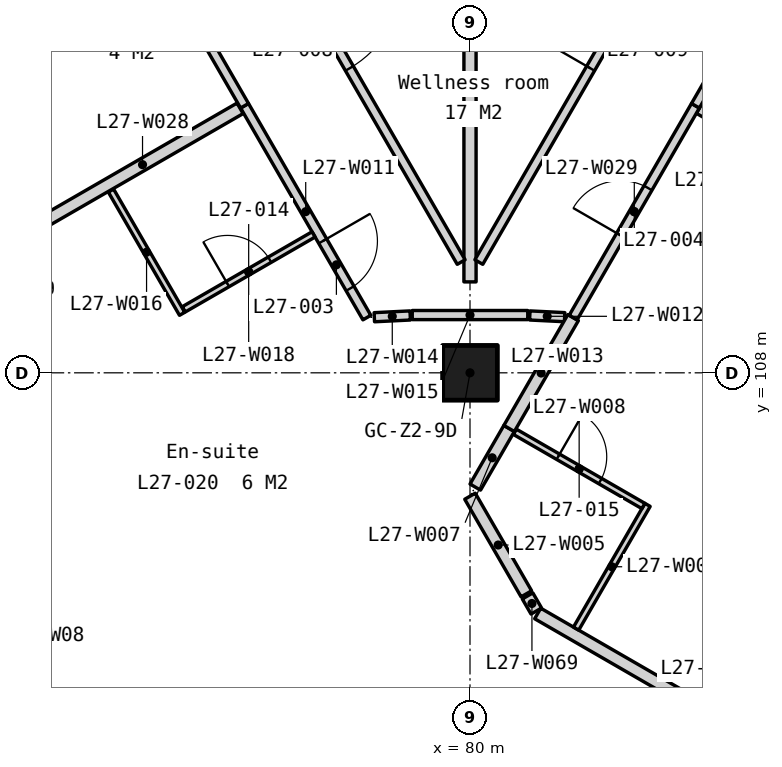
"""IFC4 building model, lengths in metres.
Left out: names, types, materials, properties, quantities, classifications, styles, units other than length and angle.
Written with IfcOpenShell. Run it as: python <this file> out.ifc"""

import sys

from ifc_helpers import new_model, si_unit, direction, frame, frame_2d, origin, origin_2d, place, context, subcontext, project, spatial, polyline, rectangle, outline, extrude, element, fill, save


model = new_model("IFC4")
c1 = context("Model", 3, precision=1e-05, world=origin(), true_north=direction((0.0, 1.0)))
c2 = subcontext(c1, "Body", "Model", "MODEL_VIEW")
j1 = project(units=[si_unit("LENGTHUNIT", "METRE"), si_unit("PLANEANGLEUNIT", "RADIAN")], contexts=[c1])
p1 = place(None, origin())
s1 = spatial("IfcSite", under=j1, at=p1, CompositionType="ELEMENT")
p2 = place(p1, origin())
s2 = spatial("IfcBuilding", under=s1, at=p2, CompositionType="ELEMENT")
p3 = place(p2, frame((0.0, 0.0, 109.8)))
s3 = spatial("IfcBuildingStorey", under=s2, at=p3, CompositionType="ELEMENT", Elevation=109.8)
p4 = place(p3, frame((80.0, 108.0, 0.0), z_axis=(0.0, 0.0, 1.0), x_axis=(1.0, 0.0, 0.0)))
e1 = element("IfcColumn", 1, at=p4, inside=s3, PredefinedType="COLUMN", context=c2, shape_type="SweptSolid", body=[
    extrude(rectangle(XDim=0.9, YDim=0.9, at=origin_2d()), origin(), (0.0, 0.0, 1.0), 3.5),
])
p5 = place(p3, frame((56.073, 130.263, -0.15), z_axis=(0.0, 0.0, 1.0), x_axis=(0.500000478905, -0.866025127289, 0.0)))
e2 = element("IfcWall", 2, at=p5, inside=s3, PredefinedType="SOLIDWALL", context=c2, shape_type="SweptSolid", body=[
    extrude(outline(polyline([(42.643, 0.0), (42.643, 3.5), (0.0, 3.5), (0.0, 0.0), (42.643, 0.0)])), frame((0.0, 0.225, 0.0), z_axis=(0.0, -1.0, 0.0), x_axis=(1.0, 0.0, 0.0)), (0.0, 0.0, 1.0), 0.45),
])
p6 = place(p5, frame((2.814, 0.0, 1.05)))
e3 = element("IfcOpeningElement", 3, at=p6, cuts=e2, PredefinedType="OPENING", context=c2, shape_type="SweptSolid", body=[
    extrude(rectangle(XDim=1.2, YDim=1.5, at=frame_2d((0.6, 0.75))), frame((0.0, 0.235, 0.0), z_axis=(0.0, -1.0, 0.0), x_axis=(1.0, 0.0, 0.0)), (0.0, 0.0, 1.0), 0.47),
])
p7 = place(p5, frame((4.514, 0.0, 1.05)))
e4 = element("IfcOpeningElement", 4, at=p7, cuts=e2, PredefinedType="OPENING", context=c2, shape_type="SweptSolid", body=[
    extrude(rectangle(XDim=1.2, YDim=1.5, at=frame_2d((0.6, 0.75))), frame((0.0, 0.235, 0.0), z_axis=(0.0, -1.0, 0.0), x_axis=(1.0, 0.0, 0.0)), (0.0, 0.0, 1.0), 0.47),
])
p8 = place(p5, frame((11.343, 0.0, 1.05)))
e5 = element("IfcOpeningElement", 5, at=p8, cuts=e2, PredefinedType="OPENING", context=c2, shape_type="SweptSolid", body=[
    extrude(rectangle(XDim=1.2, YDim=1.5, at=frame_2d((0.6, 0.75))), frame((0.0, 0.235, 0.0), z_axis=(0.0, -1.0, 0.0), x_axis=(1.0, 0.0, 0.0)), (0.0, 0.0, 1.0), 0.47),
])
p9 = place(p5, frame((13.043, 0.0, 1.05)))
e6 = element("IfcOpeningElement", 6, at=p9, cuts=e2, PredefinedType="OPENING", context=c2, shape_type="SweptSolid", body=[
    extrude(rectangle(XDim=1.2, YDim=1.5, at=frame_2d((0.6, 0.75))), frame((0.0, 0.235, 0.0), z_axis=(0.0, -1.0, 0.0), x_axis=(1.0, 0.0, 0.0)), (0.0, 0.0, 1.0), 0.47),
])
p10 = place(p5, frame((19.872, 0.0, 1.05)))
e7 = element("IfcOpeningElement", 7, at=p10, cuts=e2, PredefinedType="OPENING", context=c2, shape_type="SweptSolid", body=[
    extrude(rectangle(XDim=1.2, YDim=1.5, at=frame_2d((0.6, 0.75))), frame((0.0, 0.235, 0.0), z_axis=(0.0, -1.0, 0.0), x_axis=(1.0, 0.0, 0.0)), (0.0, 0.0, 1.0), 0.47),
])
p11 = place(p5, frame((21.572, 0.0, 1.05)))
e8 = element("IfcOpeningElement", 8, at=p11, cuts=e2, PredefinedType="OPENING", context=c2, shape_type="SweptSolid", body=[
    extrude(rectangle(XDim=1.2, YDim=1.5, at=frame_2d((0.6, 0.75))), frame((0.0, 0.235, 0.0), z_axis=(0.0, -1.0, 0.0), x_axis=(1.0, 0.0, 0.0)), (0.0, 0.0, 1.0), 0.47),
])
p12 = place(p5, frame((28.4, 0.0, 1.05)))
e9 = element("IfcOpeningElement", 9, at=p12, cuts=e2, PredefinedType="OPENING", context=c2, shape_type="SweptSolid", body=[
    extrude(rectangle(XDim=1.2, YDim=1.5, at=frame_2d((0.6, 0.75))), frame((0.0, 0.235, 0.0), z_axis=(0.0, -1.0, 0.0), x_axis=(1.0, 0.0, 0.0)), (0.0, 0.0, 1.0), 0.47),
])
p13 = place(p5, frame((30.1, 0.0, 1.05)))
e10 = element("IfcOpeningElement", 10, at=p13, cuts=e2, PredefinedType="OPENING", context=c2, shape_type="SweptSolid", body=[
    extrude(rectangle(XDim=1.2, YDim=1.5, at=frame_2d((0.6, 0.75))), frame((0.0, 0.235, 0.0), z_axis=(0.0, -1.0, 0.0), x_axis=(1.0, 0.0, 0.0)), (0.0, 0.0, 1.0), 0.47),
])
p14 = place(p5, frame((36.929, 0.0, 1.05)))
e11 = element("IfcOpeningElement", 11, at=p14, cuts=e2, PredefinedType="OPENING", context=c2, shape_type="SweptSolid", body=[
    extrude(rectangle(XDim=1.2, YDim=1.5, at=frame_2d((0.6, 0.75))), frame((0.0, 0.235, 0.0), z_axis=(0.0, -1.0, 0.0), x_axis=(1.0, 0.0, 0.0)), (0.0, 0.0, 1.0), 0.47),
])
p15 = place(p5, frame((38.629, 0.0, 1.05)))
e12 = element("IfcOpeningElement", 12, at=p15, cuts=e2, PredefinedType="OPENING", context=c2, shape_type="SweptSolid", body=[
    extrude(rectangle(XDim=1.2, YDim=1.5, at=frame_2d((0.6, 0.75))), frame((0.0, 0.235, 0.0), z_axis=(0.0, -1.0, 0.0), x_axis=(1.0, 0.0, 0.0)), (0.0, 0.0, 1.0), 0.47),
])
p16 = place(p3, frame((82.605, 93.333, -0.15), z_axis=(0.0, 0.0, 1.0), x_axis=(0.500000478905, 0.866025127289, 0.0)))
e13 = element("IfcWall", 13, at=p16, inside=s3, PredefinedType="SOLIDWALL", context=c2, shape_type="SweptSolid", body=[
    extrude(outline(polyline([(42.643, 0.0), (42.643, 3.5), (0.0, 3.5), (0.0, 0.0), (42.643, 0.0)])), frame((0.0, 0.225, 0.0), z_axis=(0.0, -1.0, 0.0), x_axis=(1.0, 0.0, 0.0)), (0.0, 0.0, 1.0), 0.45),
])
p17 = place(p16, frame((2.814, 0.0, 1.05)))
e14 = element("IfcOpeningElement", 14, at=p17, cuts=e13, PredefinedType="OPENING", context=c2, shape_type="SweptSolid", body=[
    extrude(rectangle(XDim=1.2, YDim=1.5, at=frame_2d((0.6, 0.75))), frame((0.0, 0.235, 0.0), z_axis=(0.0, -1.0, 0.0), x_axis=(1.0, 0.0, 0.0)), (0.0, 0.0, 1.0), 0.47),
])
p18 = place(p16, frame((4.514, 0.0, 1.05)))
e15 = element("IfcOpeningElement", 15, at=p18, cuts=e13, PredefinedType="OPENING", context=c2, shape_type="SweptSolid", body=[
    extrude(rectangle(XDim=1.2, YDim=1.5, at=frame_2d((0.6, 0.75))), frame((0.0, 0.235, 0.0), z_axis=(0.0, -1.0, 0.0), x_axis=(1.0, 0.0, 0.0)), (0.0, 0.0, 1.0), 0.47),
])
p19 = place(p16, frame((11.343, 0.0, 1.05)))
e16 = element("IfcOpeningElement", 16, at=p19, cuts=e13, PredefinedType="OPENING", context=c2, shape_type="SweptSolid", body=[
    extrude(rectangle(XDim=1.2, YDim=1.5, at=frame_2d((0.6, 0.75))), frame((0.0, 0.235, 0.0), z_axis=(0.0, -1.0, 0.0), x_axis=(1.0, 0.0, 0.0)), (0.0, 0.0, 1.0), 0.47),
])
p20 = place(p16, frame((13.043, 0.0, 1.05)))
e17 = element("IfcOpeningElement", 17, at=p20, cuts=e13, PredefinedType="OPENING", context=c2, shape_type="SweptSolid", body=[
    extrude(rectangle(XDim=1.2, YDim=1.5, at=frame_2d((0.6, 0.75))), frame((0.0, 0.235, 0.0), z_axis=(0.0, -1.0, 0.0), x_axis=(1.0, 0.0, 0.0)), (0.0, 0.0, 1.0), 0.47),
])
p21 = place(p16, frame((19.872, 0.0, 1.05)))
e18 = element("IfcOpeningElement", 18, at=p21, cuts=e13, PredefinedType="OPENING", context=c2, shape_type="SweptSolid", body=[
    extrude(rectangle(XDim=1.2, YDim=1.5, at=frame_2d((0.6, 0.75))), frame((0.0, 0.235, 0.0), z_axis=(0.0, -1.0, 0.0), x_axis=(1.0, 0.0, 0.0)), (0.0, 0.0, 1.0), 0.47),
])
p22 = place(p16, frame((21.572, 0.0, 1.05)))
e19 = element("IfcOpeningElement", 19, at=p22, cuts=e13, PredefinedType="OPENING", context=c2, shape_type="SweptSolid", body=[
    extrude(rectangle(XDim=1.2, YDim=1.5, at=frame_2d((0.6, 0.75))), frame((0.0, 0.235, 0.0), z_axis=(0.0, -1.0, 0.0), x_axis=(1.0, 0.0, 0.0)), (0.0, 0.0, 1.0), 0.47),
])
p23 = place(p16, frame((28.4, 0.0, 1.05)))
e20 = element("IfcOpeningElement", 20, at=p23, cuts=e13, PredefinedType="OPENING", context=c2, shape_type="SweptSolid", body=[
    extrude(rectangle(XDim=1.2, YDim=1.5, at=frame_2d((0.6, 0.75))), frame((0.0, 0.235, 0.0), z_axis=(0.0, -1.0, 0.0), x_axis=(1.0, 0.0, 0.0)), (0.0, 0.0, 1.0), 0.47),
])
p24 = place(p16, frame((30.1, 0.0, 1.05)))
e21 = element("IfcOpeningElement", 21, at=p24, cuts=e13, PredefinedType="OPENING", context=c2, shape_type="SweptSolid", body=[
    extrude(rectangle(XDim=1.2, YDim=1.5, at=frame_2d((0.6, 0.75))), frame((0.0, 0.235, 0.0), z_axis=(0.0, -1.0, 0.0), x_axis=(1.0, 0.0, 0.0)), (0.0, 0.0, 1.0), 0.47),
])
p25 = place(p16, frame((36.929, 0.0, 1.05)))
e22 = element("IfcOpeningElement", 22, at=p25, cuts=e13, PredefinedType="OPENING", context=c2, shape_type="SweptSolid", body=[
    extrude(rectangle(XDim=1.2, YDim=1.5, at=frame_2d((0.6, 0.75))), frame((0.0, 0.235, 0.0), z_axis=(0.0, -1.0, 0.0), x_axis=(1.0, 0.0, 0.0)), (0.0, 0.0, 1.0), 0.47),
])
p26 = place(p16, frame((38.629, 0.0, 1.05)))
e23 = element("IfcOpeningElement", 23, at=p26, cuts=e13, PredefinedType="OPENING", context=c2, shape_type="SweptSolid", body=[
    extrude(rectangle(XDim=1.2, YDim=1.5, at=frame_2d((0.6, 0.75))), frame((0.0, 0.235, 0.0), z_axis=(0.0, -1.0, 0.0), x_axis=(1.0, 0.0, 0.0)), (0.0, 0.0, 1.0), 0.47),
])
p27 = place(p3, frame((81.114, 104.042, 0.0), z_axis=(0.0, 0.0, 1.0), x_axis=(0.86602350115, -0.500003295444, 0.0)))
e24 = element("IfcWall", 24, at=p27, inside=s3, PredefinedType="PARTITIONING", context=c2, shape_type="SweptSolid", body=[
    extrude(rectangle(XDim=6.421, YDim=0.2, at=frame_2d((3.211, 0.0))), origin(), (0.0, 0.0, 1.0), 3.35),
])
p28 = place(p3, frame((80.0, 105.97, 0.0), z_axis=(0.0, 0.0, 1.0), x_axis=(0.499992292652, -0.866029853578, 0.0)))
e25 = element("IfcWall", 25, at=p28, inside=s3, PredefinedType="PARTITIONING", context=c2, shape_type="SweptSolid", body=[
    extrude(rectangle(XDim=1.854, YDim=0.2, at=frame_2d((0.927, 0.0))), origin(), (0.0, 0.0, 1.0), 3.35),
])
p29 = place(p3, frame((81.745, 103.793, 0.0), z_axis=(0.0, 0.0, 1.0), x_axis=(0.500016218704, 0.866016039709, 0.0)))
e26 = element("IfcWall", 26, at=p29, inside=s3, PredefinedType="PARTITIONING", context=c2, shape_type="SweptSolid", body=[
    extrude(rectangle(XDim=2.35, YDim=0.1, at=frame_2d((1.175, 0.0))), origin(), (0.0, 0.0, 1.0), 3.35),
])
p30 = place(p3, frame((80.087, 106.121, 0.0), z_axis=(0.0, 0.0, 1.0), x_axis=(0.500007201891, 0.866021245731, 0.0)))
e27 = element("IfcWall", 27, at=p30, inside=s3, PredefinedType="PARTITIONING", context=c2, shape_type="SweptSolid", body=[
    extrude(rectangle(XDim=1.113, YDim=0.2, at=frame_2d((0.557, 0.0))), origin(), (0.0, 0.0, 1.0), 3.35),
])
p31 = place(p3, frame((80.739, 107.03, 0.0), z_axis=(0.0, 0.0, 1.0), x_axis=(0.866023955769, -0.500002508028, 0.0)))
e28 = element("IfcWall", 28, at=p31, inside=s3, PredefinedType="PARTITIONING", context=c2, shape_type="SweptSolid", body=[
    extrude(rectangle(XDim=2.44, YDim=0.1, at=frame_2d((1.22, 0.0))), origin(), (0.0, 0.0, 1.0), 3.35),
])
p32 = place(p31, frame((0.82, 0.0, 0.0)))
e29 = element("IfcOpeningElement", 29, at=p32, cuts=e28, PredefinedType="OPENING", context=c2, shape_type="SweptSolid", body=[
    extrude(rectangle(XDim=0.8, YDim=2.1, at=frame_2d((0.4, 1.05))), frame((0.0, 0.06, 0.0), z_axis=(0.0, -1.0, 0.0), x_axis=(1.0, 0.0, 0.0)), (0.0, 0.0, 1.0), 0.12),
])
p33 = place(p3, frame((76.292, 112.392, 0.0), z_axis=(0.0, 0.0, 1.0), x_axis=(0.500009633848, -0.866019841608, 0.0)))
e30 = element("IfcWall", 30, at=p33, inside=s3, PredefinedType="PARTITIONING", context=c2, shape_type="SweptSolid", body=[
    extrude(rectangle(XDim=4.023, YDim=0.15, at=frame_2d((2.011, 0.0))), origin(), (0.0, 0.0, 1.0), 3.35),
])
p34 = place(p33, frame((2.571, 0.0, 0.0)))
e31 = element("IfcOpeningElement", 31, at=p34, cuts=e30, PredefinedType="OPENING", context=c2, shape_type="SweptSolid", body=[
    extrude(rectangle(XDim=0.9, YDim=2.1, at=frame_2d((0.45, 1.05))), frame((0.0, 0.085, 0.0), z_axis=(0.0, -1.0, 0.0), x_axis=(1.0, 0.0, 0.0)), (0.0, 0.0, 1.0), 0.17),
])
p35 = place(p3, frame((80.983, 108.943, 0.0), z_axis=(0.0, 0.0, 1.0), x_axis=(0.998801719891, -0.048940007579, 0.0)))
e32 = element("IfcWall", 32, at=p35, inside=s3, PredefinedType="PARTITIONING", context=c2, shape_type="SweptSolid", body=[
    extrude(rectangle(XDim=0.574, YDim=0.15, at=frame_2d((0.287, 0.0))), origin(), (0.0, 0.0, 1.0), 3.35),
])
p36 = place(p3, frame((80.643, 107.085, 0.0), z_axis=(0.0, 0.0, 1.0), x_axis=(0.499929868688, 0.86606589033, 0.0)))
e33 = element("IfcWall", 33, at=p36, inside=s3, PredefinedType="PARTITIONING", context=c2, shape_type="SweptSolid", body=[
    extrude(rectangle(XDim=2.106, YDim=0.2, at=frame_2d((1.053, 0.0))), origin(), (0.0, 0.0, 1.0), 3.35),
])
p37 = place(p3, frame((78.427, 108.914, 0.0), z_axis=(0.0, 0.0, 1.0), x_axis=(0.998790176711, 0.049175023181, 0.0)))
e34 = element("IfcWall", 34, at=p37, inside=s3, PredefinedType="PARTITIONING", context=c2, shape_type="SweptSolid", body=[
    extrude(rectangle(XDim=0.591, YDim=0.15, at=frame_2d((0.295, 0.0))), origin(), (0.0, 0.0, 1.0), 3.35),
])
p38 = place(p3, frame((79.05, 108.95, 0.0), z_axis=(0.0, 0.0, 1.0), x_axis=(1.0, 0.0, 0.0)))
e35 = element("IfcWall", 35, at=p38, inside=s3, PredefinedType="PARTITIONING", context=c2, shape_type="SweptSolid", body=[
    extrude(rectangle(XDim=1.9, YDim=0.15, at=frame_2d((0.95, 0.0))), origin(), (0.0, 0.0, 1.0), 3.35),
])
p39 = place(p3, frame((74.096, 110.997, 0.0), z_axis=(0.0, 0.0, 1.0), x_axis=(0.499954256575, -0.866051812152, 0.0)))
e36 = element("IfcWall", 36, at=p39, inside=s3, PredefinedType="PARTITIONING", context=c2, shape_type="SweptSolid", body=[
    extrude(rectangle(XDim=2.34, YDim=0.1, at=frame_2d((1.17, 0.0))), origin(), (0.0, 0.0, 1.0), 3.35),
])
p40 = place(p3, frame((80.0, 109.496, 0.0), z_axis=(0.0, 0.0, 1.0), x_axis=(0.0, 1.0, 0.0)))
e37 = element("IfcWall", 37, at=p40, inside=s3, PredefinedType="PARTITIONING", context=c2, shape_type="SweptSolid", body=[
    extrude(rectangle(XDim=8.179, YDim=0.2, at=frame_2d((4.09, 0.0))), origin(), (0.0, 0.0, 1.0), 2.801),
])
p41 = place(p3, frame((75.293, 109.044, 0.0), z_axis=(0.0, 0.0, 1.0), x_axis=(0.865997559407, 0.500048224776, 0.0)))
e38 = element("IfcWall", 38, at=p41, inside=s3, PredefinedType="PARTITIONING", context=c2, shape_type="SweptSolid", body=[
    extrude(rectangle(XDim=2.465, YDim=0.1, at=frame_2d((1.232, 0.0))), origin(), (0.0, 0.0, 1.0), 3.35),
])
p42 = place(p41, frame((0.833, 0.0, 0.0)))
e39 = element("IfcOpeningElement", 39, at=p42, cuts=e38, PredefinedType="OPENING", context=c2, shape_type="SweptSolid", body=[
    extrude(rectangle(XDim=0.8, YDim=2.1, at=frame_2d((0.4, 1.05))), frame((0.0, 0.06, 0.0), z_axis=(0.0, -1.0, 0.0), x_axis=(1.0, 0.0, 0.0)), (0.0, 0.0, 1.0), 0.12),
])
p43 = place(p3, frame((83.772, 112.355, 0.0), z_axis=(0.0, 0.0, 1.0), x_axis=(0.866094119867, -0.499880961361, 0.0)))
e40 = element("IfcWall", 40, at=p43, inside=s3, PredefinedType="PARTITIONING", context=c2, shape_type="SweptSolid", body=[
    extrude(rectangle(XDim=0.8, YDim=0.2, at=frame_2d((0.4, 0.0))), origin(), (0.0, 0.0, 1.0), 3.35),
])
p44 = place(p3, frame((73.01, 110.497, 0.0), z_axis=(0.0, 0.0, 1.0), x_axis=(0.866012199007, 0.500022870649, 0.0)))
e41 = element("IfcWall", 41, at=p44, inside=s3, PredefinedType="PARTITIONING", context=c2, shape_type="SweptSolid", body=[
    extrude(rectangle(XDim=3.705, YDim=0.2, at=frame_2d((1.853, 0.0))), origin(), (0.0, 0.0, 1.0), 3.35),
])
p45 = place(p3, frame((81.696, 108.908, 0.0), z_axis=(0.0, 0.0, 1.0), x_axis=(0.500009633848, 0.866019841608, 0.0)))
e42 = element("IfcWall", 42, at=p45, inside=s3, PredefinedType="PARTITIONING", context=c2, shape_type="SweptSolid", body=[
    extrude(rectangle(XDim=4.023, YDim=0.15, at=frame_2d((2.011, 0.0))), origin(), (0.0, 0.0, 1.0), 3.35),
])
p46 = place(p45, frame((1.562, 0.0, 0.0)))
e43 = element("IfcOpeningElement", 43, at=p46, cuts=e42, PredefinedType="OPENING", context=c2, shape_type="SweptSolid", body=[
    extrude(rectangle(XDim=0.9, YDim=2.1, at=frame_2d((0.45, 1.05))), frame((0.0, 0.085, 0.0), z_axis=(0.0, -1.0, 0.0), x_axis=(1.0, 0.0, 0.0)), (0.0, 0.0, 1.0), 0.17),
])
p47 = place(p3, frame((83.708, 112.392, 0.0), z_axis=(0.0, 0.0, 1.0), x_axis=(0.500042931351, 0.866000615939, 0.0)))
e44 = element("IfcWall", 44, at=p47, inside=s3, PredefinedType="PARTITIONING", context=c2, shape_type="SweptSolid", body=[
    extrude(rectangle(XDim=4.264, YDim=0.15, at=frame_2d((2.132, 0.0))), origin(), (0.0, 0.0, 1.0), 3.35),
])
p48 = place(p47, frame((2.964, 0.0, 0.0)))
e45 = element("IfcOpeningElement", 45, at=p48, cuts=e44, PredefinedType="OPENING", context=c2, shape_type="SweptSolid", body=[
    extrude(rectangle(XDim=1.0, YDim=2.1, at=frame_2d((0.5, 1.05))), frame((0.0, 0.085, 0.0), z_axis=(0.0, -1.0, 0.0), x_axis=(1.0, 0.0, 0.0)), (0.0, 0.0, 1.0), 0.17),
])
p49 = place(p3, frame((73.528, 117.18, 0.0), z_axis=(0.0, 0.0, 1.0), x_axis=(0.500019337512, -0.866014238979, 0.0)))
e46 = element("IfcWall", 46, at=p49, inside=s3, PredefinedType="PARTITIONING", context=c2, shape_type="SweptSolid", body=[
    extrude(rectangle(XDim=5.529, YDim=0.15, at=frame_2d((2.764, 0.0))), origin(), (0.0, 0.0, 1.0), 3.35),
])
p50 = place(p49, frame((2.264, 0.0, 0.0)))
e47 = element("IfcOpeningElement", 47, at=p50, cuts=e46, PredefinedType="OPENING", context=c2, shape_type="SweptSolid", body=[
    extrude(rectangle(XDim=1.0, YDim=2.1, at=frame_2d((0.5, 1.05))), frame((0.0, 0.085, 0.0), z_axis=(0.0, -1.0, 0.0), x_axis=(1.0, 0.0, 0.0)), (0.0, 0.0, 1.0), 0.17),
])
p51 = place(p3, frame((75.278, 117.75, 0.0), z_axis=(0.0, 0.0, 1.0), x_axis=(0.500002547313, -0.866023933087, 0.0)))
e48 = element("IfcWall", 48, at=p51, inside=s3, PredefinedType="PARTITIONING", context=c2, shape_type="SweptSolid", body=[
    extrude(rectangle(XDim=9.155, YDim=0.15, at=frame_2d((4.577, 0.0))), origin(), (0.0, 0.0, 1.0), 3.35),
])
p52 = place(p51, frame((3.677, 0.0, 0.0)))
e49 = element("IfcOpeningElement", 49, at=p52, cuts=e48, PredefinedType="OPENING", context=c2, shape_type="SweptSolid", body=[
    extrude(rectangle(XDim=1.8, YDim=2.1, at=frame_2d((0.9, 1.05))), frame((0.0, 0.085, 0.0), z_axis=(0.0, -1.0, 0.0), x_axis=(1.0, 0.0, 0.0)), (0.0, 0.0, 1.0), 0.17),
])
p53 = place(p3, frame((80.145, 109.822, 0.0), z_axis=(0.0, 0.0, 1.0), x_axis=(0.500002547313, 0.866023933087, 0.0)))
e50 = element("IfcWall", 50, at=p53, inside=s3, PredefinedType="PARTITIONING", context=c2, shape_type="SweptSolid", body=[
    extrude(rectangle(XDim=9.155, YDim=0.15, at=frame_2d((4.577, 0.0))), origin(), (0.0, 0.0, 1.0), 3.35),
])
p54 = place(p53, frame((3.677, 0.0, 0.0)))
e51 = element("IfcOpeningElement", 51, at=p54, cuts=e50, PredefinedType="OPENING", context=c2, shape_type="SweptSolid", body=[
    extrude(rectangle(XDim=1.8, YDim=2.1, at=frame_2d((0.9, 1.05))), frame((0.0, 0.085, 0.0), z_axis=(0.0, -1.0, 0.0), x_axis=(1.0, 0.0, 0.0)), (0.0, 0.0, 1.0), 0.17),
])
p55 = place(p3, frame((80.947, 104.331, 0.0), z_axis=(0.0, 0.0, 1.0), x_axis=(0.500164219654, -0.865930570761, 0.0)))
e52 = element("IfcWall", 52, at=p55, inside=s3, PredefinedType="PARTITIONING", context=c2, shape_type="SweptSolid", body=[
    extrude(rectangle(XDim=0.287, YDim=0.2, at=frame_2d((0.144, 0.0))), origin(), (0.0, 0.0, 1.0), 3.35),
])
p56 = place(p34, origin())
e53 = element("IfcDoor", 53, at=p56, inside=s3, OperationType="SINGLE_SWING_LEFT", PredefinedType="DOOR", context=c2, shape_type="SweptSolid", body=[
    extrude(rectangle(XDim=0.9, YDim=2.1, at=frame_2d((0.45, 1.05))), frame((0.0, 0.025, 0.0), z_axis=(0.0, -1.0, 0.0), x_axis=(1.0, 0.0, 0.0)), (0.0, 0.0, 1.0), 0.05),
])
fill(e31, e53)
p57 = place(p46, origin())
e54 = element("IfcDoor", 54, at=p57, inside=s3, OperationType="SINGLE_SWING_LEFT", PredefinedType="DOOR", context=c2, shape_type="SweptSolid", body=[
    extrude(rectangle(XDim=0.9, YDim=2.1, at=frame_2d((0.45, 1.05))), frame((0.0, 0.025, 0.0), z_axis=(0.0, -1.0, 0.0), x_axis=(1.0, 0.0, 0.0)), (0.0, 0.0, 1.0), 0.05),
])
fill(e43, e54)
p58 = place(p52, origin())
e55 = element("IfcDoor", 55, at=p58, inside=s3, OperationType="SINGLE_SWING_LEFT", PredefinedType="DOOR", context=c2, shape_type="SweptSolid", body=[
    extrude(rectangle(XDim=1.8, YDim=2.1, at=frame_2d((0.9, 1.05))), frame((0.0, 0.025, 0.0), z_axis=(0.0, -1.0, 0.0), x_axis=(1.0, 0.0, 0.0)), (0.0, 0.0, 1.0), 0.05),
])
fill(e49, e55)
p59 = place(p54, origin())
e56 = element("IfcDoor", 56, at=p59, inside=s3, OperationType="SINGLE_SWING_LEFT", PredefinedType="DOOR", context=c2, shape_type="SweptSolid", body=[
    extrude(rectangle(XDim=1.8, YDim=2.1, at=frame_2d((0.9, 1.05))), frame((0.0, 0.025, 0.0), z_axis=(0.0, -1.0, 0.0), x_axis=(1.0, 0.0, 0.0)), (0.0, 0.0, 1.0), 0.05),
])
fill(e51, e56)
p60 = place(p42, origin())
e57 = element("IfcDoor", 57, at=p60, inside=s3, OperationType="SINGLE_SWING_LEFT", PredefinedType="DOOR", context=c2, shape_type="SweptSolid", body=[
    extrude(rectangle(XDim=0.8, YDim=2.1, at=frame_2d((0.4, 1.05))), frame((0.0, 0.025, 0.0), z_axis=(0.0, -1.0, 0.0), x_axis=(1.0, 0.0, 0.0)), (0.0, 0.0, 1.0), 0.05),
])
fill(e39, e57)
p61 = place(p32, origin())
e58 = element("IfcDoor", 58, at=p61, inside=s3, OperationType="SINGLE_SWING_LEFT", PredefinedType="DOOR", context=c2, shape_type="SweptSolid", body=[
    extrude(rectangle(XDim=0.8, YDim=2.1, at=frame_2d((0.4, 1.05))), frame((0.0, 0.025, 0.0), z_axis=(0.0, -1.0, 0.0), x_axis=(1.0, 0.0, 0.0)), (0.0, 0.0, 1.0), 0.05),
])
fill(e29, e58)
save(model, sys.argv[1])
